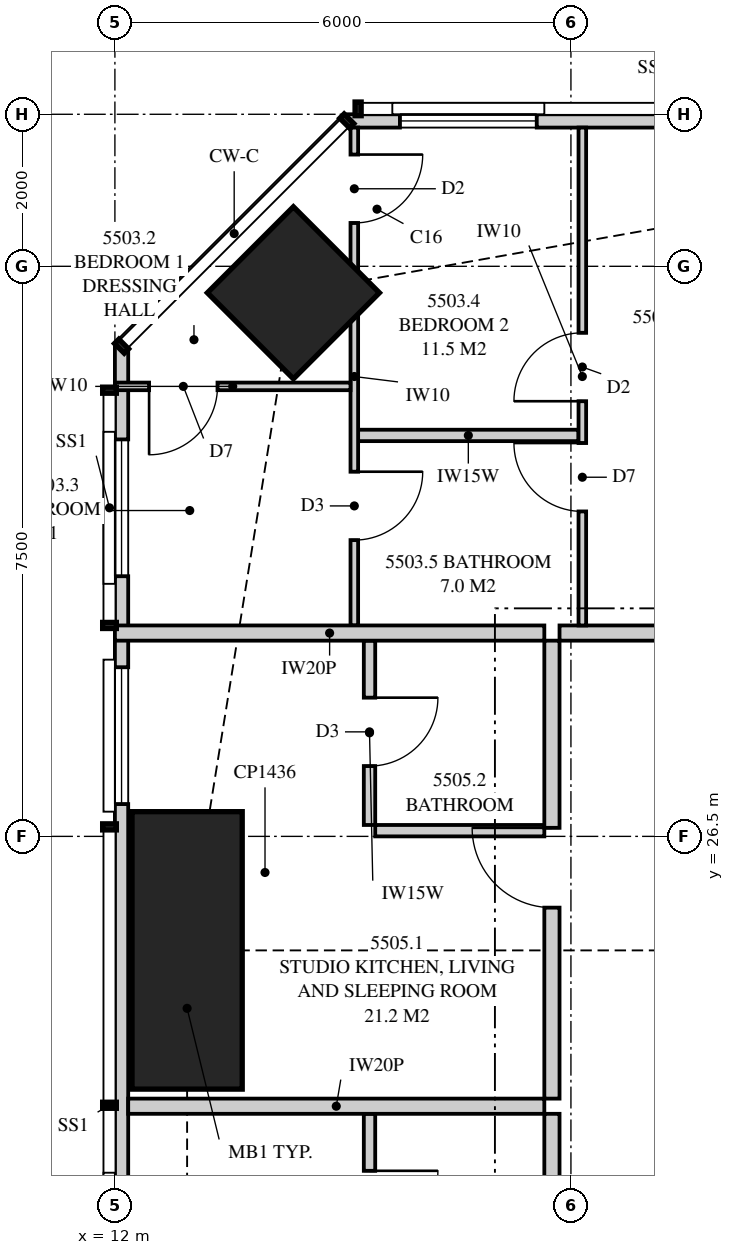
"""IFC4 building model, lengths in metres.
Left out: names, types, materials, properties, quantities, classifications, styles, units other than length and angle.
Written with IfcOpenShell. Run it as: python <this file> out.ifc"""

import sys

from ifc_helpers import new_model, si_unit, direction, frame, frame_2d, origin, origin_2d, place, context, subcontext, project, spatial, polyline, rectangle, outline, extrude, element, fill, save


model = new_model("IFC4")
c1 = context("Model", 3, precision=1e-05, world=origin(), true_north=direction((0.0, 1.0)))
c2 = subcontext(c1, "Body", "Model", "MODEL_VIEW")
j1 = project(units=[si_unit("LENGTHUNIT", "METRE"), si_unit("PLANEANGLEUNIT", "RADIAN")], contexts=[c1])
p1 = place(None, origin())
s1 = spatial("IfcSite", under=j1, at=p1, CompositionType="ELEMENT")
p2 = place(p1, origin())
s2 = spatial("IfcBuilding", under=s1, at=p2, CompositionType="ELEMENT")
p3 = place(p2, frame((0.0, 0.0, 201.25)))
s3 = spatial("IfcBuildingStorey", under=s2, at=p3, CompositionType="ELEMENT", Elevation=201.25)
p4 = place(p3, frame((14.348, 33.652, 0.0), z_axis=(0.0, 0.0, 1.0), x_axis=(0.707106781187, 0.707106781187, 0.0)))
e1 = element("IfcColumn", 1, at=p4, inside=s3, PredefinedType="COLUMN", context=c2, shape_type="SweptSolid", body=[
    extrude(rectangle(XDim=1.6, YDim=1.6, at=origin_2d()), origin(), (0.0, 0.0, 1.0), 3.35),
])
p5 = place(p3, frame((12.95, 25.0, 0.0), z_axis=(0.0, 0.0, 1.0), x_axis=(1.0, 0.0, 0.0)))
e2 = element("IfcColumn", 2, at=p5, inside=s3, PredefinedType="COLUMN", context=c2, shape_type="SweptSolid", body=[
    extrude(rectangle(XDim=1.45, YDim=3.65, at=origin_2d()), origin(), (0.0, 0.0, 1.0), 3.35),
])
p6 = place(p3, frame((49.949, 35.913, 0.0), z_axis=(0.0, 0.0, 1.0), x_axis=(-1.0, 0.0, 0.0)))
e3 = element("IfcWall", 3, at=p6, inside=s3, PredefinedType="SOLIDWALL", context=c2, shape_type="SweptSolid", body=[
    extrude(outline(polyline([(0.0, 0.0), (34.897, 0.0), (34.897, 3.11), (27.91, 3.11), (27.91, 2.15), (27.836, 2.15), (27.836, 3.11), (27.699, 3.11), (27.699, 2.15), (7.199, 2.15), (7.199, 3.11), (7.062, 3.11), (7.062, 2.15), (6.987, 2.15), (6.987, 3.11), (0.0, 3.11), (0.0, 0.0)])), frame((0.0, 0.087, 0.0), z_axis=(0.0, -1.0, 0.0), x_axis=(1.0, 0.0, 0.0)), (0.0, 0.0, 1.0), 0.175),
])
p7 = place(p6, frame((13.174, 0.0, 0.0)))
e4 = element("IfcOpeningElement", 4, at=p7, cuts=e3, PredefinedType="OPENING", context=c2, shape_type="SweptSolid", body=[
    extrude(rectangle(XDim=1.8, YDim=2.1, at=frame_2d((0.9, 1.05))), frame((0.0, 0.097, 0.0), z_axis=(0.0, -1.0, 0.0), x_axis=(1.0, 0.0, 0.0)), (0.0, 0.0, 1.0), 0.195),
])
p8 = place(p6, frame((19.374, 0.0, 0.4)))
e5 = element("IfcOpeningElement", 5, at=p8, cuts=e3, PredefinedType="OPENING", context=c2, shape_type="SweptSolid", body=[
    extrude(rectangle(XDim=1.8, YDim=1.7, at=frame_2d((0.9, 0.85))), frame((0.0, 0.097, 0.0), z_axis=(0.0, -1.0, 0.0), x_axis=(1.0, 0.0, 0.0)), (0.0, 0.0, 1.0), 0.195),
])
p9 = place(p6, frame((23.224, 0.0, 0.4)))
e6 = element("IfcOpeningElement", 6, at=p9, cuts=e3, PredefinedType="OPENING", context=c2, shape_type="SweptSolid", body=[
    extrude(rectangle(XDim=2.4, YDim=1.7, at=frame_2d((1.2, 0.85))), frame((0.0, 0.097, 0.0), z_axis=(0.0, -1.0, 0.0), x_axis=(1.0, 0.0, 0.0)), (0.0, 0.0, 1.0), 0.195),
])
p10 = place(p6, frame((32.399, 0.0, 0.4)))
e7 = element("IfcOpeningElement", 7, at=p10, cuts=e3, PredefinedType="OPENING", context=c2, shape_type="SweptSolid", body=[
    extrude(rectangle(XDim=1.8, YDim=1.7, at=frame_2d((0.9, 0.85))), frame((0.0, 0.097, 0.0), z_axis=(0.0, -1.0, 0.0), x_axis=(1.0, 0.0, 0.0)), (0.0, 0.0, 1.0), 0.195),
])
p11 = place(p3, frame((12.087, 32.949, 0.0), z_axis=(0.0, 0.0, 1.0), x_axis=(0.0, -1.0, 0.0)))
e8 = element("IfcWall", 8, at=p11, inside=s3, PredefinedType="SOLIDWALL", context=c2, shape_type="SweptSolid", body=[
    extrude(outline(polyline([(0.0, 0.0), (29.897, 0.0), (29.897, 3.11), (20.191, 3.11), (20.191, 2.15), (20.051, 2.15), (20.051, 3.11), (19.949, 3.11), (19.949, 2.15), (7.949, 2.15), (7.949, 3.11), (7.823, 3.11), (7.823, 2.15), (7.73, 2.15), (7.73, 3.11), (0.0, 3.11), (0.0, 0.0)])), frame((0.0, 0.087, 0.0), z_axis=(0.0, -1.0, 0.0), x_axis=(1.0, 0.0, 0.0)), (0.0, 0.0, 1.0), 0.175),
])
p12 = place(p11, frame((1.226, 0.0, 0.4)))
e9 = element("IfcOpeningElement", 9, at=p12, cuts=e8, PredefinedType="OPENING", context=c2, shape_type="SweptSolid", body=[
    extrude(rectangle(XDim=1.8, YDim=1.7, at=frame_2d((0.9, 0.85))), frame((0.0, 0.097, 0.0), z_axis=(0.0, -1.0, 0.0), x_axis=(1.0, 0.0, 0.0)), (0.0, 0.0, 1.0), 0.195),
])
p13 = place(p11, frame((4.224, 0.0, 0.4)))
e10 = element("IfcOpeningElement", 10, at=p13, cuts=e8, PredefinedType="OPENING", context=c2, shape_type="SweptSolid", body=[
    extrude(rectangle(XDim=1.8, YDim=1.7, at=frame_2d((0.9, 0.85))), frame((0.0, 0.097, 0.0), z_axis=(0.0, -1.0, 0.0), x_axis=(1.0, 0.0, 0.0)), (0.0, 0.0, 1.0), 0.195),
])
p14 = place(p11, frame((10.974, 0.0, 0.4)))
e11 = element("IfcOpeningElement", 11, at=p14, cuts=e8, PredefinedType="OPENING", context=c2, shape_type="SweptSolid", body=[
    extrude(rectangle(XDim=1.8, YDim=1.7, at=frame_2d((0.9, 0.85))), frame((0.0, 0.097, 0.0), z_axis=(0.0, -1.0, 0.0), x_axis=(1.0, 0.0, 0.0)), (0.0, 0.0, 1.0), 0.195),
])
p15 = place(p11, frame((14.199, 0.0, 0.4)))
e12 = element("IfcOpeningElement", 12, at=p15, cuts=e8, PredefinedType="OPENING", context=c2, shape_type="SweptSolid", body=[
    extrude(rectangle(XDim=1.8, YDim=1.7, at=frame_2d((0.9, 0.85))), frame((0.0, 0.097, 0.0), z_axis=(0.0, -1.0, 0.0), x_axis=(1.0, 0.0, 0.0)), (0.0, 0.0, 1.0), 0.195),
])
p16 = place(p11, frame((22.624, 0.0, 0.0)))
e13 = element("IfcOpeningElement", 13, at=p16, cuts=e8, PredefinedType="OPENING", context=c2, shape_type="SweptSolid", body=[
    extrude(rectangle(XDim=1.8, YDim=2.1, at=frame_2d((0.9, 1.05))), frame((0.0, 0.097, 0.0), z_axis=(0.0, -1.0, 0.0), x_axis=(1.0, 0.0, 0.0)), (0.0, 0.0, 1.0), 0.195),
])
p17 = place(p11, frame((16.799, 0.0, 0.4)))
e14 = element("IfcOpeningElement", 14, at=p17, cuts=e8, PredefinedType="OPENING", context=c2, shape_type="SweptSolid", body=[
    extrude(rectangle(XDim=1.2, YDim=1.7, at=frame_2d((0.6, 0.85))), frame((0.0, 0.097, 0.0), z_axis=(0.0, -1.0, 0.0), x_axis=(1.0, 0.0, 0.0)), (0.0, 0.0, 1.0), 0.195),
])
p18 = place(p11, frame((26.371, 0.0, 0.4)))
e15 = element("IfcOpeningElement", 15, at=p18, cuts=e8, PredefinedType="OPENING", context=c2, shape_type="SweptSolid", body=[
    extrude(rectangle(XDim=1.8, YDim=1.7, at=frame_2d((0.9, 0.85))), frame((0.0, 0.097, 0.0), z_axis=(0.0, -1.0, 0.0), x_axis=(1.0, 0.0, 0.0)), (0.0, 0.0, 1.0), 0.195),
])
p19 = place(p3, frame((17.85, 29.175, 0.0), z_axis=(0.0, 0.0, 1.0), x_axis=(1.0, 0.0, 0.0)))
e16 = element("IfcWall", 16, at=p19, inside=s3, PredefinedType="PARTITIONING", context=c2, shape_type="SweptSolid", body=[
    extrude(rectangle(XDim=3.85, YDim=0.2, at=frame_2d((1.925, 0.0))), origin(), (0.0, 0.0, 1.0), 3.11),
])
p20 = place(p3, frame((15.15, 35.825, 0.0), z_axis=(0.0, 0.0, 1.0), x_axis=(0.0, -1.0, 0.0)))
e17 = element("IfcWall", 17, at=p20, inside=s3, PredefinedType="PARTITIONING", context=c2, shape_type="SweptSolid", body=[
    extrude(outline(polyline([(0.0, 0.0), (6.55, 0.0), (6.55, 3.11), (2.905, 3.11), (2.905, 2.15), (1.158, 2.15), (1.158, 3.11), (0.0, 3.11), (0.0, 0.0)])), frame((0.0, 0.05, 0.0), z_axis=(0.0, -1.0, 0.0), x_axis=(1.0, 0.0, 0.0)), (0.0, 0.0, 1.0), 0.1),
])
p21 = place(p20, frame((0.355, 0.0, 0.0)))
e18 = element("IfcOpeningElement", 18, at=p21, cuts=e17, PredefinedType="OPENING", context=c2, shape_type="SweptSolid", body=[
    extrude(rectangle(XDim=0.9, YDim=2.1, at=frame_2d((0.45, 1.05))), frame((0.0, 0.06, 0.0), z_axis=(0.0, -1.0, 0.0), x_axis=(1.0, 0.0, 0.0)), (0.0, 0.0, 1.0), 0.12),
])
p22 = place(p20, frame((4.527, 0.0, 0.0)))
e19 = element("IfcOpeningElement", 19, at=p22, cuts=e17, PredefinedType="OPENING", context=c2, shape_type="SweptSolid", body=[
    extrude(rectangle(XDim=0.9, YDim=2.1, at=frame_2d((0.45, 1.05))), frame((0.0, 0.06, 0.0), z_axis=(0.0, -1.0, 0.0), x_axis=(1.0, 0.0, 0.0)), (0.0, 0.0, 1.0), 0.12),
])
p23 = place(p3, frame((18.15, 35.825, 0.0), z_axis=(0.0, 0.0, 1.0), x_axis=(0.0, -1.0, 0.0)))
e20 = element("IfcWall", 20, at=p23, inside=s3, PredefinedType="PARTITIONING", context=c2, shape_type="SweptSolid", body=[
    extrude(outline(polyline([(0.0, 0.0), (6.55, 0.0), (6.55, 3.11), (2.374, 3.11), (2.374, 2.15), (0.627, 2.15), (0.627, 3.11), (0.0, 3.11), (0.0, 0.0)])), frame((0.0, 0.05, 0.0), z_axis=(0.0, -1.0, 0.0), x_axis=(1.0, 0.0, 0.0)), (0.0, 0.0, 1.0), 0.1),
])
p24 = place(p23, frame((2.7, 0.0, 0.0)))
e21 = element("IfcOpeningElement", 21, at=p24, cuts=e20, PredefinedType="OPENING", context=c2, shape_type="SweptSolid", body=[
    extrude(rectangle(XDim=0.9, YDim=2.1, at=frame_2d((0.45, 1.05))), frame((0.0, 0.06, 0.0), z_axis=(0.0, -1.0, 0.0), x_axis=(1.0, 0.0, 0.0)), (0.0, 0.0, 1.0), 0.12),
])
p25 = place(p23, frame((4.15, 0.0, 0.0)))
e22 = element("IfcOpeningElement", 22, at=p25, cuts=e20, PredefinedType="OPENING", context=c2, shape_type="SweptSolid", body=[
    extrude(rectangle(XDim=0.9, YDim=2.1, at=frame_2d((0.45, 1.05))), frame((0.0, 0.06, 0.0), z_axis=(0.0, -1.0, 0.0), x_axis=(1.0, 0.0, 0.0)), (0.0, 0.0, 1.0), 0.12),
])
p26 = place(p3, frame((12.0, 32.42, 0.0), z_axis=(0.0, 0.0, 1.0), x_axis=(1.0, 0.0, 0.0)))
e23 = element("IfcWall", 23, at=p26, inside=s3, PredefinedType="PARTITIONING", context=c2, shape_type="SweptSolid", body=[
    extrude(outline(polyline([(0.0, 0.0), (3.1, 0.0), (3.1, 3.11), (3.021, 3.11), (3.021, 2.15), (1.278, 2.15), (1.278, 3.11), (0.0, 3.11), (0.0, 0.0)])), frame((0.0, 0.05, 0.0), z_axis=(0.0, -1.0, 0.0), x_axis=(1.0, 0.0, 0.0)), (0.0, 0.0, 1.0), 0.1),
])
p27 = place(p26, frame((0.45, 0.0, 0.0)))
e24 = element("IfcOpeningElement", 24, at=p27, cuts=e23, PredefinedType="OPENING", context=c2, shape_type="SweptSolid", body=[
    extrude(rectangle(XDim=0.9, YDim=2.1, at=frame_2d((0.45, 1.05))), frame((0.0, 0.06, 0.0), z_axis=(0.0, -1.0, 0.0), x_axis=(1.0, 0.0, 0.0)), (0.0, 0.0, 1.0), 0.12),
])
p28 = place(p3, frame((15.2, 31.775, 0.0), z_axis=(0.0, 0.0, 1.0), x_axis=(1.0, 0.0, 0.0)))
e25 = element("IfcWall", 25, at=p28, inside=s3, PredefinedType="PLUMBINGWALL", context=c2, shape_type="SweptSolid", body=[
    extrude(rectangle(XDim=2.9, YDim=0.15, at=frame_2d((1.45, 0.0))), origin(), (0.0, 0.0, 1.0), 3.11),
])
p29 = place(p3, frame((12.0, 29.175, 0.0), z_axis=(0.0, 0.0, 1.0), x_axis=(1.0, 0.0, 0.0)))
e26 = element("IfcWall", 26, at=p29, inside=s3, PredefinedType="PARTITIONING", context=c2, shape_type="SweptSolid", body=[
    extrude(outline(polyline([(0.0, 0.0), (5.65, 0.0), (5.65, 3.11), (2.547, 3.11), (2.547, 2.15), (0.703, 2.15), (0.703, 3.11), (0.0, 3.11), (0.0, 0.0)])), frame((0.0, 0.1, 0.0), z_axis=(0.0, -1.0, 0.0), x_axis=(1.0, 0.0, 0.0)), (0.0, 0.0, 1.0), 0.2),
])
p30 = place(p3, frame((12.175, 22.95, 0.0), z_axis=(0.0, 0.0, 1.0), x_axis=(1.0, 0.0, 0.0)))
e27 = element("IfcWall", 27, at=p30, inside=s3, PredefinedType="PARTITIONING", context=c2, shape_type="SweptSolid", body=[
    extrude(outline(polyline([(0.0, 0.0), (5.475, 0.0), (5.475, 3.11), (1.685, 3.11), (1.685, 2.15), (0.0, 2.15), (0.0, 3.11), (0.0, 0.0)])), frame((0.0, 0.1, 0.0), z_axis=(0.0, -1.0, 0.0), x_axis=(1.0, 0.0, 0.0)), (0.0, 0.0, 1.0), 0.2),
])
p31 = place(p3, frame((17.75, 7.925, 0.0), z_axis=(0.0, 0.0, 1.0), x_axis=(0.0, 1.0, 0.0)))
e28 = element("IfcWall", 28, at=p31, inside=s3, PredefinedType="PARTITIONING", context=c2, shape_type="SweptSolid", body=[
    extrude(outline(polyline([(0.0, 0.0), (14.925, 0.0), (14.925, 3.11), (5.412, 3.11), (5.412, 2.541), (4.738, 2.541), (4.738, 3.11), (0.0, 3.11), (0.0, 0.0)])), frame((0.0, 0.1, 0.0), z_axis=(0.0, -1.0, 0.0), x_axis=(1.0, 0.0, 0.0)), (0.0, 0.0, 1.0), 0.2),
])
p32 = place(p31, frame((6.962, 0.0, 0.0)))
e29 = element("IfcOpeningElement", 29, at=p32, cuts=e28, PredefinedType="OPENING", context=c2, shape_type="SweptSolid", body=[
    extrude(rectangle(XDim=1.05, YDim=2.2, at=frame_2d((0.525, 1.1))), frame((0.0, 0.11, 0.0), z_axis=(0.0, -1.0, 0.0), x_axis=(1.0, 0.0, 0.0)), (0.0, 0.0, 1.0), 0.22),
])
p33 = place(p3, frame((15.35, 20.425, 0.0), z_axis=(0.0, 0.0, 1.0), x_axis=(0.0, 1.0, 0.0)))
e30 = element("IfcWall", 30, at=p33, inside=s3, PredefinedType="PLUMBINGWALL", context=c2, shape_type="SweptSolid", body=[
    extrude(rectangle(XDim=2.425, YDim=0.15, at=frame_2d((1.212, 0.0))), origin(), (0.0, 0.0, 1.0), 3.11),
])
p34 = place(p33, frame((0.775, 0.0, 0.0)))
e31 = element("IfcOpeningElement", 31, at=p34, cuts=e30, PredefinedType="OPENING", context=c2, shape_type="SweptSolid", body=[
    extrude(rectangle(XDim=0.9, YDim=2.1, at=frame_2d((0.45, 1.05))), frame((0.0, 0.085, 0.0), z_axis=(0.0, -1.0, 0.0), x_axis=(1.0, 0.0, 0.0)), (0.0, 0.0, 1.0), 0.17),
])
p35 = place(p3, frame((17.75, 23.05, 0.0), z_axis=(0.0, 0.0, 1.0), x_axis=(0.0, 1.0, 0.0)))
e32 = element("IfcWall", 32, at=p35, inside=s3, PredefinedType="PARTITIONING", context=c2, shape_type="SweptSolid", body=[
    extrude(outline(polyline([(0.0, 0.0), (6.025, 0.0), (6.025, 3.11), (2.287, 3.11), (2.287, 2.541), (1.613, 2.541), (1.613, 3.11), (0.0, 3.11), (0.0, 0.0)])), frame((0.0, 0.1, 0.0), z_axis=(0.0, -1.0, 0.0), x_axis=(1.0, 0.0, 0.0)), (0.0, 0.0, 1.0), 0.2),
])
p36 = place(p35, frame((2.512, 0.0, 0.0)))
e33 = element("IfcOpeningElement", 33, at=p36, cuts=e32, PredefinedType="OPENING", context=c2, shape_type="SweptSolid", body=[
    extrude(rectangle(XDim=1.05, YDim=2.2, at=frame_2d((0.525, 1.1))), frame((0.0, 0.11, 0.0), z_axis=(0.0, -1.0, 0.0), x_axis=(1.0, 0.0, 0.0)), (0.0, 0.0, 1.0), 0.22),
])
p37 = place(p3, frame((15.35, 26.65, 0.0), z_axis=(0.0, 0.0, 1.0), x_axis=(0.0, 1.0, 0.0)))
e34 = element("IfcWall", 34, at=p37, inside=s3, PredefinedType="PLUMBINGWALL", context=c2, shape_type="SweptSolid", body=[
    extrude(rectangle(XDim=2.425, YDim=0.15, at=frame_2d((1.212, 0.0))), origin(), (0.0, 0.0, 1.0), 3.11),
])
p38 = place(p37, frame((0.775, 0.0, 0.0)))
e35 = element("IfcOpeningElement", 35, at=p38, cuts=e34, PredefinedType="OPENING", context=c2, shape_type="SweptSolid", body=[
    extrude(rectangle(XDim=0.9, YDim=2.1, at=frame_2d((0.45, 1.05))), frame((0.0, 0.085, 0.0), z_axis=(0.0, -1.0, 0.0), x_axis=(1.0, 0.0, 0.0)), (0.0, 0.0, 1.0), 0.17),
])
p39 = place(p3, frame((15.425, 26.575, 0.0), z_axis=(0.0, 0.0, 1.0), x_axis=(1.0, 0.0, 0.0)))
e36 = element("IfcWall", 36, at=p39, inside=s3, PredefinedType="PLUMBINGWALL", context=c2, shape_type="SweptSolid", body=[
    extrude(rectangle(XDim=2.225, YDim=0.15, at=frame_2d((1.112, 0.0))), origin(), (0.0, 0.0, 1.0), 3.11),
])
p40 = place(p10, origin())
e37 = element("IfcWindow", 37, at=p40, inside=s3, PartitioningType="SINGLE_PANEL", PredefinedType="WINDOW", context=c2, shape_type="SweptSolid", body=[
    extrude(rectangle(XDim=1.8, YDim=1.7, at=frame_2d((0.9, 0.85))), frame((0.0, 0.03, 0.0), z_axis=(0.0, -1.0, 0.0), x_axis=(1.0, 0.0, 0.0)), (0.0, 0.0, 1.0), 0.06),
])
fill(e7, e37)
p41 = place(p12, origin())
e38 = element("IfcWindow", 38, at=p41, inside=s3, PartitioningType="SINGLE_PANEL", PredefinedType="WINDOW", context=c2, shape_type="SweptSolid", body=[
    extrude(rectangle(XDim=1.8, YDim=1.7, at=frame_2d((0.9, 0.85))), frame((0.0, 0.03, 0.0), z_axis=(0.0, -1.0, 0.0), x_axis=(1.0, 0.0, 0.0)), (0.0, 0.0, 1.0), 0.06),
])
fill(e9, e38)
p42 = place(p13, origin())
e39 = element("IfcWindow", 39, at=p42, inside=s3, PartitioningType="SINGLE_PANEL", PredefinedType="WINDOW", context=c2, shape_type="SweptSolid", body=[
    extrude(rectangle(XDim=1.8, YDim=1.7, at=frame_2d((0.9, 0.85))), frame((0.0, 0.03, 0.0), z_axis=(0.0, -1.0, 0.0), x_axis=(1.0, 0.0, 0.0)), (0.0, 0.0, 1.0), 0.06),
])
fill(e10, e39)
p43 = place(p27, frame((0.9, 0.0, 0.0), z_axis=(0.0, 0.0, 1.0), x_axis=(-1.0, 0.0, 0.0)))
e40 = element("IfcDoor", 40, at=p43, inside=s3, OperationType="SINGLE_SWING_RIGHT", PredefinedType="DOOR", context=c2, shape_type="SweptSolid", body=[
    extrude(rectangle(XDim=0.9, YDim=2.1, at=frame_2d((0.45, 1.05))), frame((0.0, 0.025, 0.0), z_axis=(0.0, -1.0, 0.0), x_axis=(1.0, 0.0, 0.0)), (0.0, 0.0, 1.0), 0.05),
])
fill(e24, e40)
p44 = place(p21, origin())
e41 = element("IfcDoor", 41, at=p44, inside=s3, OperationType="SINGLE_SWING_LEFT", PredefinedType="DOOR", context=c2, shape_type="SweptSolid", body=[
    extrude(rectangle(XDim=0.9, YDim=2.1, at=frame_2d((0.45, 1.05))), frame((0.0, 0.025, 0.0), z_axis=(0.0, -1.0, 0.0), x_axis=(1.0, 0.0, 0.0)), (0.0, 0.0, 1.0), 0.05),
])
fill(e18, e41)
p45 = place(p24, frame((0.9, 0.0, 0.0), z_axis=(0.0, 0.0, 1.0), x_axis=(-1.0, 0.0, 0.0)))
e42 = element("IfcDoor", 42, at=p45, inside=s3, OperationType="SINGLE_SWING_LEFT", PredefinedType="DOOR", context=c2, shape_type="SweptSolid", body=[
    extrude(rectangle(XDim=0.9, YDim=2.1, at=frame_2d((0.45, 1.05))), frame((0.0, 0.025, 0.0), z_axis=(0.0, -1.0, 0.0), x_axis=(1.0, 0.0, 0.0)), (0.0, 0.0, 1.0), 0.05),
])
fill(e21, e42)
p46 = place(p25, frame((0.9, 0.0, 0.0), z_axis=(0.0, 0.0, 1.0), x_axis=(-1.0, 0.0, 0.0)))
e43 = element("IfcDoor", 43, at=p46, inside=s3, OperationType="SINGLE_SWING_RIGHT", PredefinedType="DOOR", context=c2, shape_type="SweptSolid", body=[
    extrude(rectangle(XDim=0.9, YDim=2.1, at=frame_2d((0.45, 1.05))), frame((0.0, 0.025, 0.0), z_axis=(0.0, -1.0, 0.0), x_axis=(1.0, 0.0, 0.0)), (0.0, 0.0, 1.0), 0.05),
])
fill(e22, e43)
p47 = place(p22, origin())
e44 = element("IfcDoor", 44, at=p47, inside=s3, OperationType="SINGLE_SWING_LEFT", PredefinedType="DOOR", context=c2, shape_type="SweptSolid", body=[
    extrude(rectangle(XDim=0.9, YDim=2.1, at=frame_2d((0.45, 1.05))), frame((0.0, 0.025, 0.0), z_axis=(0.0, -1.0, 0.0), x_axis=(1.0, 0.0, 0.0)), (0.0, 0.0, 1.0), 0.05),
])
fill(e19, e44)
p48 = place(p34, frame((0.9, 0.0, 0.0), z_axis=(0.0, 0.0, 1.0), x_axis=(-1.0, 0.0, 0.0)))
e45 = element("IfcDoor", 45, at=p48, inside=s3, OperationType="SINGLE_SWING_LEFT", PredefinedType="DOOR", context=c2, shape_type="SweptSolid", body=[
    extrude(rectangle(XDim=0.9, YDim=2.1, at=frame_2d((0.45, 1.05))), frame((0.0, 0.025, 0.0), z_axis=(0.0, -1.0, 0.0), x_axis=(1.0, 0.0, 0.0)), (0.0, 0.0, 1.0), 0.05),
])
fill(e31, e45)
p49 = place(p36, origin())
e46 = element("IfcDoor", 46, at=p49, inside=s3, OperationType="SINGLE_SWING_RIGHT", PredefinedType="DOOR", context=c2, shape_type="SweptSolid", body=[
    extrude(rectangle(XDim=1.05, YDim=2.2, at=frame_2d((0.525, 1.1))), frame((0.0, 0.025, 0.0), z_axis=(0.0, -1.0, 0.0), x_axis=(1.0, 0.0, 0.0)), (0.0, 0.0, 1.0), 0.05),
])
fill(e33, e46)
p50 = place(p38, frame((0.9, 0.0, 0.0), z_axis=(0.0, 0.0, 1.0), x_axis=(-1.0, 0.0, 0.0)))
e47 = element("IfcDoor", 47, at=p50, inside=s3, OperationType="SINGLE_SWING_LEFT", PredefinedType="DOOR", context=c2, shape_type="SweptSolid", body=[
    extrude(rectangle(XDim=0.9, YDim=2.1, at=frame_2d((0.45, 1.05))), frame((0.0, 0.025, 0.0), z_axis=(0.0, -1.0, 0.0), x_axis=(1.0, 0.0, 0.0)), (0.0, 0.0, 1.0), 0.05),
])
fill(e35, e47)
save(model, sys.argv[1])
